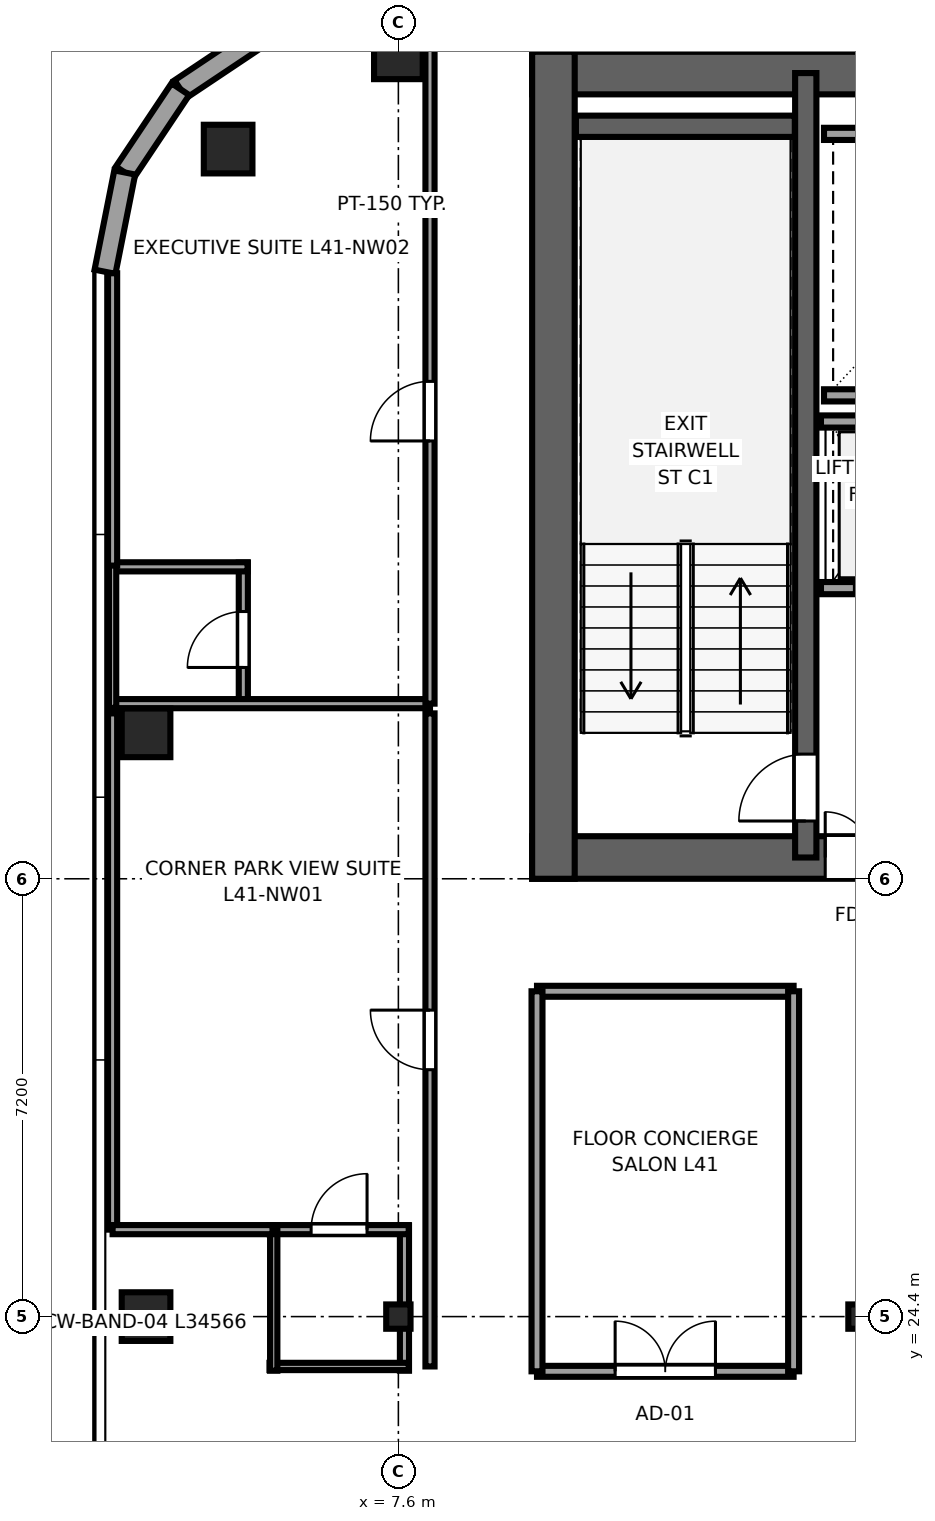
"""IFC4 building model, lengths in metres.
Left out: names, types, materials, properties, quantities, classifications, styles, units other than length and angle.
Written with IfcOpenShell. Run it as: python <this file> out.ifc"""

import sys

from ifc_helpers import new_model, si_unit, direction, frame, frame_2d, origin, origin_2d, place, context, subcontext, project, spatial, rectangle, i_section, extrude, source, transform, mapped, element, fill, save


model = new_model("IFC4")
c1 = context("Model", 3, precision=1e-05, world=origin(), true_north=direction((0.0, 1.0)))
c2 = subcontext(c1, "Body", "Model", "MODEL_VIEW")
j1 = project(units=[si_unit("LENGTHUNIT", "METRE"), si_unit("PLANEANGLEUNIT", "RADIAN")], contexts=[c1])
p1 = place(None, origin())
s1 = spatial("IfcSite", under=j1, at=p1, CompositionType="ELEMENT")
p2 = place(p1, origin())
s2 = spatial("IfcBuilding", under=s1, at=p2, CompositionType="ELEMENT")
p3 = place(p2, frame((0.0, 0.0, 157.7)))
s3 = spatial("IfcBuildingStorey", under=s2, at=p3, CompositionType="ELEMENT", Elevation=157.7)
p4 = place(p3, frame((9.8, 31.95, 0.0), z_axis=(0.0, 0.0, 1.0), x_axis=(1.0, 0.0, 0.0)))
e1 = element("IfcWall", 1, at=p4, inside=s3, PredefinedType="SHEAR", context=c2, shape_type="SweptSolid", body=[
    extrude(rectangle(XDim=26.4, YDim=0.7, at=frame_2d((13.2, 0.0))), origin(), (0.0, 0.0, 1.0), 3.55),
])
p5 = place(p4, frame((6.32, 0.0, 0.0), z_axis=(0.0, 0.0, 1.0), x_axis=(-1.0, 0.0, 0.0)))
e2 = element("IfcOpeningElement", 2, at=p5, cuts=e1, PredefinedType="OPENING", context=c2, shape_type="SweptSolid", body=[
    extrude(rectangle(XDim=1.5, YDim=2.04, at=frame_2d((0.75, 1.02))), frame((0.0, 0.36, 0.0), z_axis=(0.0, -1.0, 0.0), x_axis=(1.0, 0.0, 0.0)), (0.0, 0.0, 1.0), 0.72),
])
p6 = place(p4, frame((13.95, 0.0, 0.0), z_axis=(0.0, 0.0, 1.0), x_axis=(-1.0, 0.0, 0.0)))
e3 = element("IfcOpeningElement", 3, at=p6, cuts=e1, PredefinedType="OPENING", context=c2, shape_type="SweptSolid", body=[
    extrude(rectangle(XDim=1.5, YDim=2.04, at=frame_2d((0.75, 1.02))), frame((0.0, 0.36, 0.0), z_axis=(0.0, -1.0, 0.0), x_axis=(1.0, 0.0, 0.0)), (0.0, 0.0, 1.0), 0.72),
])
p7 = place(p4, frame((21.58, 0.0, 0.0), z_axis=(0.0, 0.0, 1.0), x_axis=(-1.0, 0.0, 0.0)))
e4 = element("IfcOpeningElement", 4, at=p7, cuts=e1, PredefinedType="OPENING", context=c2, shape_type="SweptSolid", body=[
    extrude(rectangle(XDim=1.5, YDim=2.04, at=frame_2d((0.75, 1.02))), frame((0.0, 0.36, 0.0), z_axis=(0.0, -1.0, 0.0), x_axis=(1.0, 0.0, 0.0)), (0.0, 0.0, 1.0), 0.72),
])
p8 = place(p4, frame((8.37, 0.0, 0.0), z_axis=(0.0, 0.0, 1.0), x_axis=(-1.0, 0.0, 0.0)))
e5 = element("IfcOpeningElement", 5, at=p8, cuts=e1, PredefinedType="OPENING", context=c2, shape_type="SweptSolid", body=[
    extrude(rectangle(XDim=0.82, YDim=2.01, at=frame_2d((0.41, 1.005))), frame((0.0, 0.36, 0.0), z_axis=(0.0, -1.0, 0.0), x_axis=(1.0, 0.0, 0.0)), (0.0, 0.0, 1.0), 0.72),
])
p9 = place(p4, frame((18.87, 0.0, 0.0), z_axis=(0.0, 0.0, 1.0), x_axis=(-1.0, 0.0, 0.0)))
e6 = element("IfcOpeningElement", 6, at=p9, cuts=e1, PredefinedType="OPENING", context=c2, shape_type="SweptSolid", body=[
    extrude(rectangle(XDim=0.82, YDim=2.01, at=frame_2d((0.41, 1.005))), frame((0.0, 0.36, 0.0), z_axis=(0.0, -1.0, 0.0), x_axis=(1.0, 0.0, 0.0)), (0.0, 0.0, 1.0), 0.72),
])
p10 = place(p3, frame((9.8, 44.85, 0.0), z_axis=(0.0, 0.0, 1.0), x_axis=(1.0, 0.0, 0.0)))
e7 = element("IfcWall", 7, at=p10, inside=s3, PredefinedType="SHEAR", context=c2, shape_type="SweptSolid", body=[
    extrude(rectangle(XDim=26.4, YDim=0.7, at=frame_2d((13.2, 0.0))), origin(), (0.0, 0.0, 1.0), 3.55),
])
p11 = place(p3, frame((10.15, 31.6, 0.0), z_axis=(0.0, 0.0, 1.0), x_axis=(0.0, 1.0, 0.0)))
e8 = element("IfcWall", 8, at=p11, inside=s3, PredefinedType="SHEAR", context=c2, shape_type="SweptSolid", body=[
    extrude(rectangle(XDim=13.6, YDim=0.7, at=frame_2d((6.8, 0.0))), origin(), (0.0, 0.0, 1.0), 3.55),
])
p12 = place(p3, frame((14.3, 31.95, 0.0), z_axis=(0.0, 0.0, 1.0), x_axis=(0.0, 1.0, 0.0)))
e9 = element("IfcWall", 9, at=p12, inside=s3, PredefinedType="SHEAR", context=c2, shape_type="SweptSolid", body=[
    extrude(rectangle(XDim=12.9, YDim=0.35, at=frame_2d((6.45, 0.0))), origin(), (0.0, 0.0, 1.0), 3.55),
])
p13 = place(p12, frame((0.6, 0.0, 0.0)))
e10 = element("IfcOpeningElement", 10, at=p13, cuts=e9, PredefinedType="OPENING", context=c2, shape_type="SweptSolid", body=[
    extrude(rectangle(XDim=1.1, YDim=2.12, at=frame_2d((0.55, 1.06))), frame((0.0, 0.185, 0.0), z_axis=(0.0, -1.0, 0.0), x_axis=(1.0, 0.0, 0.0)), (0.0, 0.0, 1.0), 0.37),
])
p14 = place(p3, frame((10.52, 43.975, 0.0), z_axis=(0.0, 0.0, 1.0), x_axis=(1.0, 0.0, 0.0)))
e11 = element("IfcWall", 11, at=p14, inside=s3, PredefinedType="SHEAR", context=c2, shape_type="SweptSolid", body=[
    extrude(rectangle(XDim=3.6, YDim=0.35, at=frame_2d((1.8, 0.0))), origin(), (0.0, 0.0, 1.0), 3.55),
])
m1 = source(origin(), c2, "Body", "SweptSolid", [
    extrude(rectangle(XDim=0.8, YDim=0.8, at=origin_2d()), origin(), (0.0, 0.0, 1.0), 3.55),
])
p15 = place(p3, frame((3.45, 24.4, 0.0), z_axis=(0.0, 0.0, 1.0), x_axis=(1.0, 0.0, 0.0)))
e12 = element("IfcColumn", 12, at=p15, inside=s3, PredefinedType="COLUMN", context=c2, shape_type="MappedRepresentation", body=[
    mapped(m1, transform((0.0, 0.0, 0.0), x_axis=(1.0, 0.0, 0.0), y_axis=(0.0, 1.0, 0.0), z_axis=(0.0, 0.0, 1.0), scale=1.0)),
])
m2 = source(origin(), c2, "Body", "SweptSolid", [
    extrude(i_section(OverallWidth=0.4, OverallDepth=0.4, WebThickness=0.02, FlangeThickness=0.035, at=origin_2d()), origin(), (0.0, 0.0, 1.0), 3.55),
])
for number, where, z_axis, x_axis in (
    (13, (7.6, 24.4, 0.0), (0.0, 0.0, 1.0), (1.0, 0.0, 0.0)),
    (14, (15.2, 24.4, 0.0), (0.0, 0.0, 1.0), (1.0, 0.0, 0.0)),
):
    element("IfcColumn", number, at=place(p3, frame(where, z_axis=z_axis, x_axis=x_axis)), inside=s3, PredefinedType="COLUMN", context=c2, shape_type="MappedRepresentation", body=[
        mapped(m2, transform((0.0, 0.0, 0.0), x_axis=(1.0, 0.0, 0.0), y_axis=(0.0, 1.0, 0.0), z_axis=(0.0, 0.0, 1.0), scale=1.0)),
    ])
for number, where, z_axis, x_axis in (
    (15, (4.8, 43.6, 0.0), (0.0, 0.0, 1.0), (1.0, 0.0, 0.0)),
    (16, (7.6, 45.15, 0.0), (0.0, 0.0, 1.0), (1.0, 0.0, 0.0)),
    (17, (3.45, 34.0, 0.0), (0.0, 0.0, 1.0), (1.0, 0.0, 0.0)),
):
    element("IfcColumn", number, at=place(p3, frame(where, z_axis=z_axis, x_axis=x_axis)), inside=s3, PredefinedType="COLUMN", context=c2, shape_type="MappedRepresentation", body=[
        mapped(m1, transform((0.0, 0.0, 0.0), x_axis=(1.0, 0.0, 0.0), y_axis=(0.0, 1.0, 0.0), z_axis=(0.0, 0.0, 1.0), scale=1.0)),
    ])
for number, where, z_axis, x_axis in (
    (18, (5.385, 45.5, 0.0), (0.0, 0.0, 1.0), (-0.832, -0.556, 0.0)),
    (19, (4.015, 44.585, 0.0), (0.0, 0.0, 1.0), (-0.556, -0.831, 0.0)),
):
    element("IfcWall", number, at=place(p3, frame(where, z_axis=z_axis, x_axis=x_axis)), inside=s3, PredefinedType="SOLIDWALL", context=c2, shape_type="SweptSolid", body=[
        extrude(rectangle(XDim=1.647, YDim=0.35, at=frame_2d((0.824, 0.0))), origin(), (0.0, 0.0, 1.0), 2.832),
    ])
p16 = place(p3, frame((3.1, 43.216, 0.0), z_axis=(0.0, 0.0, 1.0), x_axis=(-0.195044345786, -0.980794424524, 0.0)))
e20 = element("IfcWall", 20, at=p16, inside=s3, PredefinedType="SOLIDWALL", context=c2, shape_type="SweptSolid", body=[
    extrude(rectangle(XDim=1.665, YDim=0.35, at=frame_2d((0.833, 0.0))), origin(), (0.0, 0.0, 1.0), 3.37),
])
for number, where, z_axis, x_axis in (
    (21, (14.6, 39.55, 0.0), (0.0, 0.0, 1.0), (1.0, 0.0, 0.0)),
    (22, (14.6, 43.85, 0.0), (0.0, 0.0, 1.0), (1.0, 0.0, 0.0)),
):
    element("IfcWall", number, at=place(p3, frame(where, z_axis=z_axis, x_axis=x_axis)), inside=s3, PredefinedType="SOLIDWALL", context=c2, shape_type="SweptSolid", body=[
        extrude(rectangle(XDim=4.1, YDim=0.2, at=frame_2d((2.05, 0.0))), origin(), (0.0, 0.0, 1.0), 3.37),
    ])
p17 = place(p3, frame((14.55, 36.38, 0.0), z_axis=(0.0, 0.0, 1.0), x_axis=(1.0, 0.0, 0.0)))
e23 = element("IfcWall", 23, at=p17, inside=s3, PredefinedType="SOLIDWALL", context=c2, shape_type="SweptSolid", body=[
    extrude(rectangle(XDim=4.075, YDim=0.2, at=frame_2d((2.038, 0.0))), origin(), (0.0, 0.0, 1.0), 3.37),
])
p18 = place(p17, frame((0.55, 0.0, 0.0)))
e24 = element("IfcOpeningElement", 24, at=p18, cuts=e23, PredefinedType="OPENING", context=c2, shape_type="SweptSolid", body=[
    extrude(rectangle(XDim=1.1, YDim=2.12, at=frame_2d((0.55, 1.06))), frame((0.0, 0.11, 0.0), z_axis=(0.0, -1.0, 0.0), x_axis=(1.0, 0.0, 0.0)), (0.0, 0.0, 1.0), 0.22),
])
p19 = place(p17, frame((2.45, 0.0, 0.0)))
e25 = element("IfcOpeningElement", 25, at=p19, cuts=e23, PredefinedType="OPENING", context=c2, shape_type="SweptSolid", body=[
    extrude(rectangle(XDim=1.1, YDim=2.12, at=frame_2d((0.55, 1.06))), frame((0.0, 0.11, 0.0), z_axis=(0.0, -1.0, 0.0), x_axis=(1.0, 0.0, 0.0)), (0.0, 0.0, 1.0), 0.22),
])
p20 = place(p3, frame((14.55, 39.12, 0.0), z_axis=(0.0, 0.0, 1.0), x_axis=(1.0, 0.0, 0.0)))
e26 = element("IfcWall", 26, at=p20, inside=s3, PredefinedType="SOLIDWALL", context=c2, shape_type="SweptSolid", body=[
    extrude(rectangle(XDim=4.075, YDim=0.2, at=frame_2d((2.038, 0.0))), origin(), (0.0, 0.0, 1.0), 3.37),
])
p21 = place(p3, frame((7.7, 23.51, 0.0), z_axis=(0.0, 0.0, 1.0), x_axis=(0.0, 1.0, 0.0)))
e27 = element("IfcWall", 27, at=p21, inside=s3, PredefinedType="PARTITIONING", context=c2, shape_type="SweptSolid", body=[
    extrude(rectangle(XDim=2.39, YDim=0.15, at=frame_2d((1.195, 0.0))), origin(), (0.0, 0.0, 1.0), 2.16),
])
p22 = place(p3, frame((5.48, 23.58, 0.0), z_axis=(0.0, 0.0, 1.0), x_axis=(1.0, 0.0, 0.0)))
e28 = element("IfcWall", 28, at=p22, inside=s3, PredefinedType="PLUMBINGWALL", context=c2, shape_type="SweptSolid", body=[
    extrude(rectangle(XDim=2.29, YDim=0.12, at=frame_2d((1.145, 0.0))), origin(), (0.0, 0.0, 1.0), 3.37),
])
p23 = place(p3, frame((5.48, 25.83, 0.0), z_axis=(0.0, 0.0, 1.0), x_axis=(1.0, 0.0, 0.0)))
e29 = element("IfcWall", 29, at=p23, inside=s3, PredefinedType="PARTITIONING", context=c2, shape_type="SweptSolid", body=[
    extrude(rectangle(XDim=2.29, YDim=0.15, at=frame_2d((1.145, 0.0))), origin(), (0.0, 0.0, 1.0), 3.37),
])
p24 = place(p23, frame((0.685, 0.0, 0.0)))
e30 = element("IfcOpeningElement", 30, at=p24, cuts=e29, PredefinedType="OPENING", context=c2, shape_type="SweptSolid", body=[
    extrude(rectangle(XDim=0.92, YDim=2.01, at=frame_2d((0.46, 1.005))), frame((0.0, 0.085, 0.0), z_axis=(0.0, -1.0, 0.0), x_axis=(1.0, 0.0, 0.0)), (0.0, 0.0, 1.0), 0.17),
])
p25 = place(p3, frame((5.55, 23.51, 0.0), z_axis=(0.0, 0.0, 1.0), x_axis=(0.0, 1.0, 0.0)))
e31 = element("IfcWall", 31, at=p25, inside=s3, PredefinedType="PLUMBINGWALL", context=c2, shape_type="SweptSolid", body=[
    extrude(rectangle(XDim=2.39, YDim=0.12, at=frame_2d((1.195, 0.0))), origin(), (0.0, 0.0, 1.0), 3.37),
])
p26 = place(p3, frame((5.05, 34.41, 0.0), z_axis=(0.0, 0.0, 1.0), x_axis=(0.0, 1.0, 0.0)))
e32 = element("IfcWall", 32, at=p26, inside=s3, PredefinedType="PARTITIONING", context=c2, shape_type="SweptSolid", body=[
    extrude(rectangle(XDim=2.39, YDim=0.15, at=frame_2d((1.195, 0.0))), origin(), (0.0, 0.0, 1.0), 3.37),
])
p27 = place(p26, frame((0.665, 0.0, 0.0)))
e33 = element("IfcOpeningElement", 33, at=p27, cuts=e32, PredefinedType="OPENING", context=c2, shape_type="SweptSolid", body=[
    extrude(rectangle(XDim=0.92, YDim=2.01, at=frame_2d((0.46, 1.005))), frame((0.0, 0.085, 0.0), z_axis=(0.0, -1.0, 0.0), x_axis=(1.0, 0.0, 0.0)), (0.0, 0.0, 1.0), 0.17),
])
p28 = place(p3, frame((2.83, 34.48, 0.0), z_axis=(0.0, 0.0, 1.0), x_axis=(1.0, 0.0, 0.0)))
e34 = element("IfcWall", 34, at=p28, inside=s3, PredefinedType="PARTITIONING", context=c2, shape_type="SweptSolid", body=[
    extrude(rectangle(XDim=5.29, YDim=0.15, at=frame_2d((2.645, 0.0))), origin(), (0.0, 0.0, 1.0), 3.37),
])
p29 = place(p3, frame((2.83, 36.73, 0.0), z_axis=(0.0, 0.0, 1.0), x_axis=(1.0, 0.0, 0.0)))
e35 = element("IfcWall", 35, at=p29, inside=s3, PredefinedType="PARTITIONING", context=c2, shape_type="SweptSolid", body=[
    extrude(rectangle(XDim=2.29, YDim=0.15, at=frame_2d((1.145, 0.0))), origin(), (0.0, 0.0, 1.0), 3.37),
])
p30 = place(p3, frame((2.9, 34.41, 0.0), z_axis=(0.0, 0.0, 1.0), x_axis=(0.0, 1.0, 0.0)))
e36 = element("IfcWall", 36, at=p30, inside=s3, PredefinedType="PLUMBINGWALL", context=c2, shape_type="SweptSolid", body=[
    extrude(rectangle(XDim=2.39, YDim=0.12, at=frame_2d((1.195, 0.0))), origin(), (0.0, 0.0, 1.0), 3.37),
])
p31 = place(p3, frame((8.12, 23.58, 0.0), z_axis=(0.0, 0.0, 1.0), x_axis=(0.0, 1.0, 0.0)))
e37 = element("IfcWall", 37, at=p31, inside=s3, PredefinedType="PARTITIONING", context=c2, shape_type="SweptSolid", body=[
    extrude(rectangle(XDim=10.74, YDim=0.15, at=frame_2d((5.37, 0.0))), origin(), (0.0, 0.0, 1.0), 3.37),
])
p32 = place(p31, frame((4.88, 0.0, 0.0)))
e38 = element("IfcOpeningElement", 38, at=p32, cuts=e37, PredefinedType="OPENING", context=c2, shape_type="SweptSolid", body=[
    extrude(rectangle(XDim=0.98, YDim=2.12, at=frame_2d((0.49, 1.06))), frame((0.0, 0.085, 0.0), z_axis=(0.0, -1.0, 0.0), x_axis=(1.0, 0.0, 0.0)), (0.0, 0.0, 1.0), 0.17),
])
p33 = place(p3, frame((2.9, 25.83, 0.0), z_axis=(0.0, 0.0, 1.0), x_axis=(0.0, 1.0, 0.0)))
e39 = element("IfcWall", 39, at=p33, inside=s3, PredefinedType="PARTITIONING", context=c2, shape_type="SweptSolid", body=[
    extrude(rectangle(XDim=8.49, YDim=0.15, at=frame_2d((4.245, 0.0))), origin(), (0.0, 0.0, 1.0), 3.37),
])
p34 = place(p3, frame((2.9, 25.83, 0.0), z_axis=(0.0, 0.0, 1.0), x_axis=(1.0, 0.0, 0.0)))
e40 = element("IfcWall", 40, at=p34, inside=s3, PredefinedType="PARTITIONING", context=c2, shape_type="SweptSolid", body=[
    extrude(rectangle(XDim=2.63, YDim=0.15, at=frame_2d((1.315, 0.0))), origin(), (0.0, 0.0, 1.0), 3.37),
])
p35 = place(p3, frame((8.12, 34.48, 0.0), z_axis=(0.0, 0.0, 1.0), x_axis=(0.0, 1.0, 0.0)))
e41 = element("IfcWall", 41, at=p35, inside=s3, PredefinedType="PARTITIONING", context=c2, shape_type="SweptSolid", body=[
    extrude(rectangle(XDim=11.115, YDim=0.15, at=frame_2d((5.558, 0.0))), origin(), (0.0, 0.0, 1.0), 3.37),
])
p36 = place(p35, frame((4.32, 0.0, 0.0)))
e42 = element("IfcOpeningElement", 42, at=p36, cuts=e41, PredefinedType="OPENING", context=c2, shape_type="SweptSolid", body=[
    extrude(rectangle(XDim=0.98, YDim=2.12, at=frame_2d((0.49, 1.06))), frame((0.0, 0.085, 0.0), z_axis=(0.0, -1.0, 0.0), x_axis=(1.0, 0.0, 0.0)), (0.0, 0.0, 1.0), 0.17),
])
p37 = place(p3, frame((2.9, 36.75, 0.0), z_axis=(0.0, 0.0, 1.0), x_axis=(0.0, 1.0, 0.0)))
e43 = element("IfcWall", 43, at=p37, inside=s3, PredefinedType="PARTITIONING", context=c2, shape_type="SweptSolid", body=[
    extrude(rectangle(XDim=4.808, YDim=0.15, at=frame_2d((2.404, 0.0))), origin(), (0.0, 0.0, 1.0), 3.37),
])
p38 = place(p3, frame((9.88, 23.5, 0.0), z_axis=(0.0, 0.0, 1.0), x_axis=(1.0, 0.0, 0.0)))
e44 = element("IfcWall", 44, at=p38, inside=s3, PredefinedType="PARTITIONING", context=c2, shape_type="SweptSolid", body=[
    extrude(rectangle(XDim=4.22, YDim=0.18, at=frame_2d((2.11, 0.0))), origin(), (0.0, 0.0, 1.0), 3.37),
])
p39 = place(p38, frame((1.285, 0.0, 0.0)))
e45 = element("IfcOpeningElement", 45, at=p39, cuts=e44, PredefinedType="OPENING", context=c2, shape_type="SweptSolid", body=[
    extrude(rectangle(XDim=1.65, YDim=2.15, at=frame_2d((0.825, 1.075))), frame((0.0, 0.1, 0.0), z_axis=(0.0, -1.0, 0.0), x_axis=(1.0, 0.0, 0.0)), (0.0, 0.0, 1.0), 0.2),
])
p40 = place(p3, frame((9.88, 29.75, 0.0), z_axis=(0.0, 0.0, 1.0), x_axis=(1.0, 0.0, 0.0)))
e46 = element("IfcWall", 46, at=p40, inside=s3, PredefinedType="PARTITIONING", context=c2, shape_type="SweptSolid", body=[
    extrude(rectangle(XDim=4.22, YDim=0.18, at=frame_2d((2.11, 0.0))), origin(), (0.0, 0.0, 1.0), 3.37),
])
for number, where, z_axis, x_axis in (
    (47, (9.88, 23.5, 0.0), (0.0, 0.0, 1.0), (0.0, 1.0, 0.0)),
    (48, (14.1, 23.5, 0.0), (0.0, 0.0, 1.0), (0.0, 1.0, 0.0)),
):
    element("IfcWall", number, at=place(p3, frame(where, z_axis=z_axis, x_axis=x_axis)), inside=s3, PredefinedType="PARTITIONING", context=c2, shape_type="SweptSolid", body=[
        extrude(rectangle(XDim=6.25, YDim=0.18, at=frame_2d((3.125, 0.0))), origin(), (0.0, 0.0, 1.0), 3.37),
    ])
m3 = source(origin(), c2, "Body", "SweptSolid", [
    extrude(rectangle(XDim=1.1, YDim=2.12, at=frame_2d((0.55, 1.06))), frame((0.0, 0.025, 0.0), z_axis=(0.0, -1.0, 0.0), x_axis=(1.0, 0.0, 0.0)), (0.0, 0.0, 1.0), 0.05),
])
p41 = place(p13, origin())
e49 = element("IfcDoor", 49, at=p41, inside=s3, OperationType="SINGLE_SWING_LEFT", PredefinedType="DOOR", context=c2, shape_type="MappedRepresentation", body=[
    mapped(m3, transform((0.0, 0.0, 0.0), x_axis=(1.0, 0.0, 0.0), y_axis=(0.0, 1.0, 0.0), z_axis=(0.0, 0.0, 1.0), scale=1.0)),
])
fill(e10, e49)
m4 = source(origin(), c2, "Body", "SweptSolid", [
    extrude(rectangle(XDim=1.5, YDim=2.04, at=frame_2d((0.75, 1.02))), frame((0.0, 0.025, 0.0), z_axis=(0.0, -1.0, 0.0), x_axis=(1.0, 0.0, 0.0)), (0.0, 0.0, 1.0), 0.05),
])
p42 = place(p5, origin())
e50 = element("IfcDoor", 50, at=p42, inside=s3, OperationType="DOUBLE_DOOR_SINGLE_SWING", PredefinedType="DOOR", context=c2, shape_type="MappedRepresentation", body=[
    mapped(m4, transform((0.0, 0.0, 0.0), x_axis=(1.0, 0.0, 0.0), y_axis=(0.0, 1.0, 0.0), z_axis=(0.0, 0.0, 1.0), scale=1.0)),
])
fill(e2, e50)
m5 = source(origin(), c2, "Body", "SweptSolid", [
    extrude(rectangle(XDim=0.92, YDim=2.01, at=frame_2d((0.46, 1.005))), frame((0.0, 0.025, 0.0), z_axis=(0.0, -1.0, 0.0), x_axis=(1.0, 0.0, 0.0)), (0.0, 0.0, 1.0), 0.05),
])
p43 = place(p24, origin())
e51 = element("IfcDoor", 51, at=p43, inside=s3, OperationType="SINGLE_SWING_RIGHT", PredefinedType="DOOR", context=c2, shape_type="MappedRepresentation", body=[
    mapped(m5, transform((0.0, 0.0, 0.0), x_axis=(1.0, 0.0, 0.0), y_axis=(0.0, 1.0, 0.0), z_axis=(0.0, 0.0, 1.0), scale=1.0)),
])
fill(e30, e51)
p44 = place(p27, origin())
e52 = element("IfcDoor", 52, at=p44, inside=s3, OperationType="SINGLE_SWING_LEFT", PredefinedType="DOOR", context=c2, shape_type="MappedRepresentation", body=[
    mapped(m5, transform((0.0, 0.0, 0.0), x_axis=(1.0, 0.0, 0.0), y_axis=(0.0, 1.0, 0.0), z_axis=(0.0, 0.0, 1.0), scale=1.0)),
])
fill(e33, e52)
m6 = source(origin(), c2, "Body", "SweptSolid", [
    extrude(rectangle(XDim=0.98, YDim=2.12, at=frame_2d((0.49, 1.06))), frame((0.0, 0.025, 0.0), z_axis=(0.0, -1.0, 0.0), x_axis=(1.0, 0.0, 0.0)), (0.0, 0.0, 1.0), 0.05),
])
p45 = place(p32, origin())
e53 = element("IfcDoor", 53, at=p45, inside=s3, OperationType="SINGLE_SWING_RIGHT", PredefinedType="DOOR", context=c2, shape_type="MappedRepresentation", body=[
    mapped(m6, transform((0.0, 0.0, 0.0), x_axis=(1.0, 0.0, 0.0), y_axis=(0.0, 1.0, 0.0), z_axis=(0.0, 0.0, 1.0), scale=1.0)),
])
fill(e38, e53)
p46 = place(p36, origin())
e54 = element("IfcDoor", 54, at=p46, inside=s3, OperationType="SINGLE_SWING_LEFT", PredefinedType="DOOR", context=c2, shape_type="MappedRepresentation", body=[
    mapped(m6, transform((0.0, 0.0, 0.0), x_axis=(1.0, 0.0, 0.0), y_axis=(0.0, 1.0, 0.0), z_axis=(0.0, 0.0, 1.0), scale=1.0)),
])
fill(e42, e54)
m7 = source(origin(), c2, "Body", "SweptSolid", [
    extrude(rectangle(XDim=1.65, YDim=2.15, at=frame_2d((0.825, 1.075))), frame((0.0, 0.025, 0.0), z_axis=(0.0, -1.0, 0.0), x_axis=(1.0, 0.0, 0.0)), (0.0, 0.0, 1.0), 0.05),
])
p47 = place(p39, origin())
e55 = element("IfcDoor", 55, at=p47, inside=s3, OperationType="DOUBLE_DOOR_SINGLE_SWING", PredefinedType="DOOR", context=c2, shape_type="MappedRepresentation", body=[
    mapped(m7, transform((0.0, 0.0, 0.0), x_axis=(1.0, 0.0, 0.0), y_axis=(0.0, 1.0, 0.0), z_axis=(0.0, 0.0, 1.0), scale=1.0)),
])
fill(e45, e55)
save(model, sys.argv[1])
